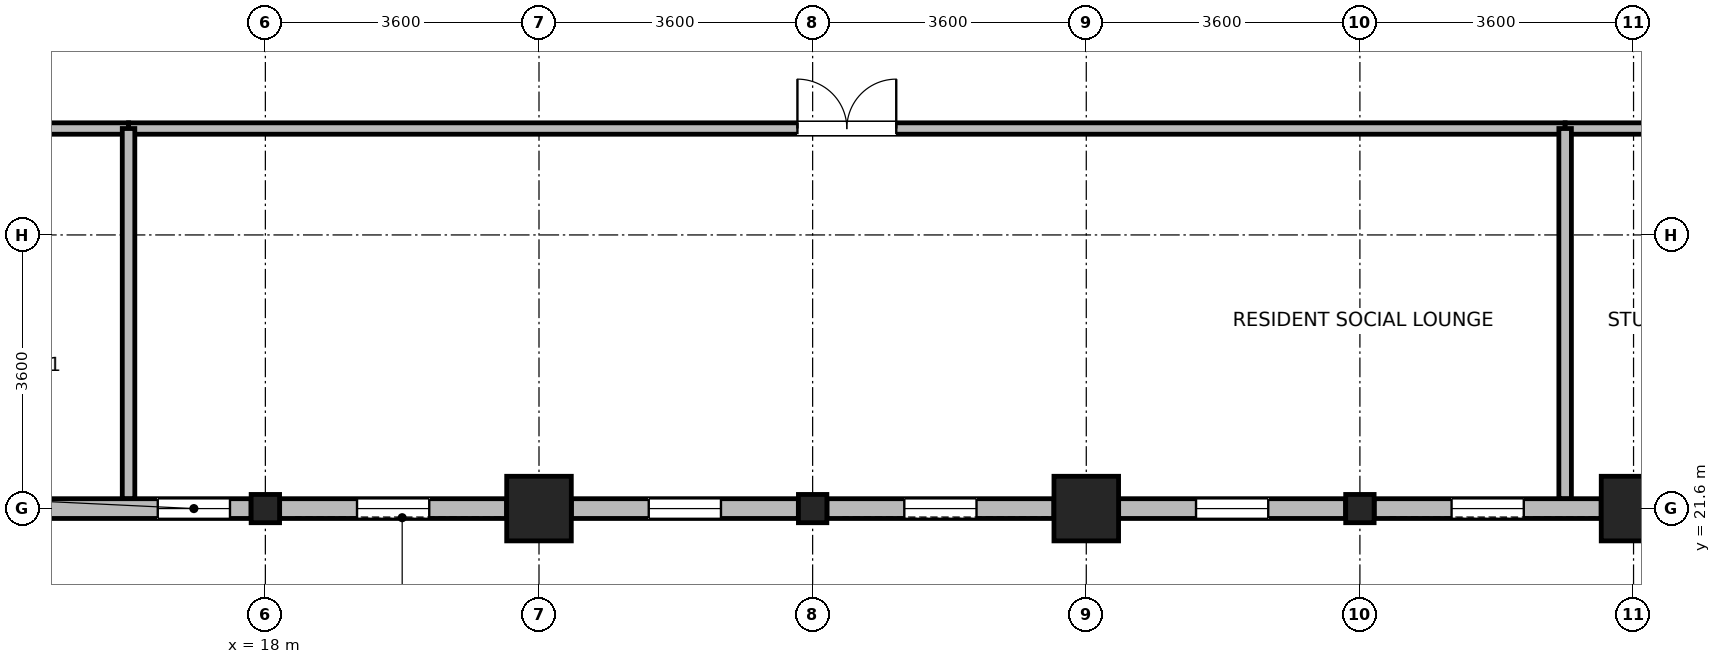
"""IFC4 building model, lengths in metres.
Left out: names, types, materials, properties, quantities, classifications, styles, units other than length and angle.
Written with IfcOpenShell. Run it as: python <this file> out.ifc"""

import sys

from ifc_helpers import new_model, si_unit, direction, frame, frame_2d, origin, origin_2d, place, context, subcontext, project, spatial, rectangle, i_section, extrude, source, transform, mapped, element, fill, save


model = new_model("IFC4")
c1 = context("Model", 3, precision=1e-05, world=origin(), true_north=direction((0.0, 1.0)))
c2 = subcontext(c1, "Body", "Model", "MODEL_VIEW")
j1 = project(units=[si_unit("LENGTHUNIT", "METRE"), si_unit("PLANEANGLEUNIT", "RADIAN")], contexts=[c1])
p1 = place(None, origin())
s1 = spatial("IfcSite", under=j1, at=p1, CompositionType="ELEMENT")
p2 = place(p1, origin())
s2 = spatial("IfcBuilding", under=s1, at=p2, CompositionType="ELEMENT")
p3 = place(p2, frame((0.0, 0.0, 279.5)))
s3 = spatial("IfcBuildingStorey", under=s2, at=p3, CompositionType="ELEMENT", Elevation=279.5)
m1 = source(origin(), c2, "Body", "SweptSolid", [
    extrude(rectangle(XDim=0.85, YDim=0.85, at=origin_2d()), origin(), (0.0, 0.0, 1.0), 3.7),
])
for number, where, z_axis, x_axis in (
    (1, (21.6, 21.6, 0.0), (0.0, 0.0, 1.0), (1.0, 0.0, 0.0)),
    (2, (28.8, 21.6, 0.0), (0.0, 0.0, 1.0), (1.0, 0.0, 0.0)),
    (3, (36.0, 21.6, 0.0), (0.0, 0.0, 1.0), (1.0, 0.0, 0.0)),
):
    element("IfcColumn", number, at=place(p3, frame(where, z_axis=z_axis, x_axis=x_axis)), inside=s3, PredefinedType="COLUMN", context=c2, shape_type="MappedRepresentation", body=[
        mapped(m1, transform((0.0, 0.0, 0.0), x_axis=(1.0, 0.0, 0.0), y_axis=(0.0, 1.0, 0.0), z_axis=(0.0, 0.0, 1.0), scale=1.0)),
    ])
m2 = source(origin(), c2, "Body", "SweptSolid", [
    extrude(i_section(OverallWidth=0.374, OverallDepth=0.372, WebThickness=0.015, FlangeThickness=0.026, FilletRadius=0.015, at=origin_2d()), origin(), (0.0, 0.0, 1.0), 3.7),
])
for number, where, z_axis, x_axis in (
    (4, (18.0, 21.6, 0.0), (0.0, 0.0, 1.0), (1.0, 0.0, 0.0)),
    (5, (25.2, 21.6, 0.0), (0.0, 0.0, 1.0), (1.0, 0.0, 0.0)),
    (6, (32.4, 21.6, 0.0), (0.0, 0.0, 1.0), (1.0, 0.0, 0.0)),
):
    element("IfcColumn", number, at=place(p3, frame(where, z_axis=z_axis, x_axis=x_axis)), inside=s3, PredefinedType="COLUMN", context=c2, shape_type="MappedRepresentation", body=[
        mapped(m2, transform((0.0, 0.0, 0.0), x_axis=(1.0, 0.0, 0.0), y_axis=(0.0, 1.0, 0.0), z_axis=(0.0, 0.0, 1.0), scale=1.0)),
    ])
p4 = place(p3, frame((17.812, 21.6, 0.0), z_axis=(0.0, 0.0, 1.0), x_axis=(-1.0, 0.0, 0.0)))
e7 = element("IfcWall", 7, at=p4, inside=s3, PredefinedType="STANDARD", context=c2, shape_type="SweptSolid", body=[
    extrude(rectangle(XDim=2.986, YDim=0.26, at=frame_2d((1.493, 0.0))), origin(), (0.0, 0.0, 1.0), 3.055),
])
p5 = place(p4, frame((0.278, 0.0, 0.85)))
e8 = element("IfcOpeningElement", 8, at=p5, cuts=e7, PredefinedType="OPENING", context=c2, shape_type="SweptSolid", body=[
    extrude(rectangle(XDim=0.95, YDim=1.75, at=frame_2d((0.475, 0.875))), frame((0.0, 0.14, 0.0), z_axis=(0.0, -1.0, 0.0), x_axis=(1.0, 0.0, 0.0)), (0.0, 0.0, 1.0), 0.28),
])
p6 = place(p3, frame((21.174, 21.6, 0.0), z_axis=(0.0, 0.0, 1.0), x_axis=(-1.0, 0.0, 0.0)))
e9 = element("IfcWall", 9, at=p6, inside=s3, PredefinedType="STANDARD", context=c2, shape_type="SweptSolid", body=[
    extrude(rectangle(XDim=2.986, YDim=0.26, at=frame_2d((1.493, 0.0))), origin(), (0.0, 0.0, 1.0), 3.055),
])
p7 = place(p6, frame((1.018, 0.0, 0.85)))
e10 = element("IfcOpeningElement", 10, at=p7, cuts=e9, PredefinedType="OPENING", context=c2, shape_type="SweptSolid", body=[
    extrude(rectangle(XDim=0.95, YDim=1.75, at=frame_2d((0.475, 0.875))), frame((0.0, 0.14, 0.0), z_axis=(0.0, -1.0, 0.0), x_axis=(1.0, 0.0, 0.0)), (0.0, 0.0, 1.0), 0.28),
])
p8 = place(p3, frame((25.012, 21.6, 0.0), z_axis=(0.0, 0.0, 1.0), x_axis=(-1.0, 0.0, 0.0)))
e11 = element("IfcWall", 11, at=p8, inside=s3, PredefinedType="STANDARD", context=c2, shape_type="SweptSolid", body=[
    extrude(rectangle(XDim=2.986, YDim=0.26, at=frame_2d((1.493, 0.0))), origin(), (0.0, 0.0, 1.0), 3.055),
])
p9 = place(p8, frame((1.018, 0.0, 0.85)))
e12 = element("IfcOpeningElement", 12, at=p9, cuts=e11, PredefinedType="OPENING", context=c2, shape_type="SweptSolid", body=[
    extrude(rectangle(XDim=0.95, YDim=1.75, at=frame_2d((0.475, 0.875))), frame((0.0, 0.14, 0.0), z_axis=(0.0, -1.0, 0.0), x_axis=(1.0, 0.0, 0.0)), (0.0, 0.0, 1.0), 0.28),
])
p10 = place(p3, frame((28.374, 21.6, 0.0), z_axis=(0.0, 0.0, 1.0), x_axis=(-1.0, 0.0, 0.0)))
e13 = element("IfcWall", 13, at=p10, inside=s3, PredefinedType="STANDARD", context=c2, shape_type="SweptSolid", body=[
    extrude(rectangle(XDim=2.986, YDim=0.26, at=frame_2d((1.493, 0.0))), origin(), (0.0, 0.0, 1.0), 3.055),
])
p11 = place(p10, frame((1.018, 0.0, 0.85)))
e14 = element("IfcOpeningElement", 14, at=p11, cuts=e13, PredefinedType="OPENING", context=c2, shape_type="SweptSolid", body=[
    extrude(rectangle(XDim=0.95, YDim=1.75, at=frame_2d((0.475, 0.875))), frame((0.0, 0.14, 0.0), z_axis=(0.0, -1.0, 0.0), x_axis=(1.0, 0.0, 0.0)), (0.0, 0.0, 1.0), 0.28),
])
p12 = place(p3, frame((32.212, 21.6, 0.0), z_axis=(0.0, 0.0, 1.0), x_axis=(-1.0, 0.0, 0.0)))
e15 = element("IfcWall", 15, at=p12, inside=s3, PredefinedType="STANDARD", context=c2, shape_type="SweptSolid", body=[
    extrude(rectangle(XDim=2.986, YDim=0.26, at=frame_2d((1.493, 0.0))), origin(), (0.0, 0.0, 1.0), 3.055),
])
p13 = place(p12, frame((1.018, 0.0, 0.85)))
e16 = element("IfcOpeningElement", 16, at=p13, cuts=e15, PredefinedType="OPENING", context=c2, shape_type="SweptSolid", body=[
    extrude(rectangle(XDim=0.95, YDim=1.75, at=frame_2d((0.475, 0.875))), frame((0.0, 0.14, 0.0), z_axis=(0.0, -1.0, 0.0), x_axis=(1.0, 0.0, 0.0)), (0.0, 0.0, 1.0), 0.28),
])
p14 = place(p3, frame((35.574, 21.6, 0.0), z_axis=(0.0, 0.0, 1.0), x_axis=(-1.0, 0.0, 0.0)))
e17 = element("IfcWall", 17, at=p14, inside=s3, PredefinedType="STANDARD", context=c2, shape_type="SweptSolid", body=[
    extrude(rectangle(XDim=2.986, YDim=0.26, at=frame_2d((1.493, 0.0))), origin(), (0.0, 0.0, 1.0), 3.055),
])
p15 = place(p14, frame((1.018, 0.0, 0.85)))
e18 = element("IfcOpeningElement", 18, at=p15, cuts=e17, PredefinedType="OPENING", context=c2, shape_type="SweptSolid", body=[
    extrude(rectangle(XDim=0.95, YDim=1.75, at=frame_2d((0.475, 0.875))), frame((0.0, 0.14, 0.0), z_axis=(0.0, -1.0, 0.0), x_axis=(1.0, 0.0, 0.0)), (0.0, 0.0, 1.0), 0.28),
])
p16 = place(p3, frame((16.2, 26.6, 0.0), z_axis=(0.0, 0.0, 1.0), x_axis=(1.0, 0.0, 0.0)))
e19 = element("IfcWall", 19, at=p16, inside=s3, PredefinedType="PARTITIONING", context=c2, shape_type="SweptSolid", body=[
    extrude(rectangle(XDim=18.9, YDim=0.15, at=frame_2d((9.45, 0.0))), origin(), (0.0, 0.0, 1.0), 3.455),
])
p17 = place(p16, frame((8.8, 0.0, 0.0)))
e20 = element("IfcOpeningElement", 20, at=p17, cuts=e19, PredefinedType="OPENING", context=c2, shape_type="SweptSolid", body=[
    extrude(rectangle(XDim=1.3, YDim=2.12, at=frame_2d((0.65, 1.06))), frame((0.0, 0.085, 0.0), z_axis=(0.0, -1.0, 0.0), x_axis=(1.0, 0.0, 0.0)), (0.0, 0.0, 1.0), 0.17),
])
p18 = place(p3, frame((3.732, 26.6, 0.0), z_axis=(0.0, 0.0, 1.0), x_axis=(1.0, 0.0, 0.0)))
e21 = element("IfcWall", 21, at=p18, inside=s3, PredefinedType="PARTITIONING", context=c2, shape_type="SweptSolid", body=[
    extrude(rectangle(XDim=12.468, YDim=0.15, at=frame_2d((6.234, 0.0))), origin(), (0.0, 0.0, 1.0), 3.455),
])
p19 = place(p18, frame((5.584, 0.0, 0.0)))
e22 = element("IfcOpeningElement", 22, at=p19, cuts=e21, PredefinedType="OPENING", context=c2, shape_type="SweptSolid", body=[
    extrude(rectangle(XDim=1.3, YDim=2.12, at=frame_2d((0.65, 1.06))), frame((0.0, 0.085, 0.0), z_axis=(0.0, -1.0, 0.0), x_axis=(1.0, 0.0, 0.0)), (0.0, 0.0, 1.0), 0.17),
])
p20 = place(p3, frame((35.1, 26.6, 0.0), z_axis=(0.0, 0.0, 1.0), x_axis=(1.0, 0.0, 0.0)))
e23 = element("IfcWall", 23, at=p20, inside=s3, PredefinedType="PARTITIONING", context=c2, shape_type="SweptSolid", body=[
    extrude(rectangle(XDim=9.16, YDim=0.15, at=frame_2d((4.58, 0.0))), origin(), (0.0, 0.0, 1.0), 3.455),
])
p21 = place(p20, frame((4.105, 0.0, 0.0)))
e24 = element("IfcOpeningElement", 24, at=p21, cuts=e23, PredefinedType="OPENING", context=c2, shape_type="SweptSolid", body=[
    extrude(rectangle(XDim=0.95, YDim=2.1, at=frame_2d((0.475, 1.05))), frame((0.0, 0.085, 0.0), z_axis=(0.0, -1.0, 0.0), x_axis=(1.0, 0.0, 0.0)), (0.0, 0.0, 1.0), 0.17),
])
for number, where, z_axis, x_axis in (
    (25, (16.2, 21.732, 0.0), (0.0, 0.0, 1.0), (0.0, 1.0, 0.0)),
    (26, (35.1, 21.732, 0.0), (0.0, 0.0, 1.0), (0.0, 1.0, 0.0)),
):
    element("IfcWall", number, at=place(p3, frame(where, z_axis=z_axis, x_axis=x_axis)), inside=s3, PredefinedType="PARTITIONING", context=c2, shape_type="SweptSolid", body=[
        extrude(rectangle(XDim=4.868, YDim=0.165, at=frame_2d((2.434, 0.0))), origin(), (0.0, 0.0, 1.0), 3.455),
    ])
p22 = place(p5, origin())
e27 = element("IfcWindow", 27, at=p22, inside=s3, PartitioningType="SINGLE_PANEL", PredefinedType="WINDOW", context=c2, shape_type="SweptSolid", body=[
    extrude(rectangle(XDim=0.95, YDim=1.75, at=frame_2d((0.475, 0.875))), frame((0.0, 0.03, 0.0), z_axis=(0.0, -1.0, 0.0), x_axis=(1.0, 0.0, 0.0)), (0.0, 0.0, 1.0), 0.06),
])
fill(e8, e27)
p23 = place(p7, origin())
e28 = element("IfcWindow", 28, at=p23, inside=s3, PartitioningType="SINGLE_PANEL", PredefinedType="WINDOW", context=c2, shape_type="SweptSolid", body=[
    extrude(rectangle(XDim=0.95, YDim=1.75, at=frame_2d((0.475, 0.875))), frame((0.0, 0.03, 0.0), z_axis=(0.0, -1.0, 0.0), x_axis=(1.0, 0.0, 0.0)), (0.0, 0.0, 1.0), 0.06),
])
fill(e10, e28)
p24 = place(p9, origin())
e29 = element("IfcWindow", 29, at=p24, inside=s3, PartitioningType="SINGLE_PANEL", PredefinedType="WINDOW", context=c2, shape_type="SweptSolid", body=[
    extrude(rectangle(XDim=0.95, YDim=1.75, at=frame_2d((0.475, 0.875))), frame((0.0, 0.03, 0.0), z_axis=(0.0, -1.0, 0.0), x_axis=(1.0, 0.0, 0.0)), (0.0, 0.0, 1.0), 0.06),
])
fill(e12, e29)
p25 = place(p11, origin())
e30 = element("IfcWindow", 30, at=p25, inside=s3, PartitioningType="SINGLE_PANEL", PredefinedType="WINDOW", context=c2, shape_type="SweptSolid", body=[
    extrude(rectangle(XDim=0.95, YDim=1.75, at=frame_2d((0.475, 0.875))), frame((0.0, 0.03, 0.0), z_axis=(0.0, -1.0, 0.0), x_axis=(1.0, 0.0, 0.0)), (0.0, 0.0, 1.0), 0.06),
])
fill(e14, e30)
p26 = place(p13, origin())
e31 = element("IfcWindow", 31, at=p26, inside=s3, PartitioningType="SINGLE_PANEL", PredefinedType="WINDOW", context=c2, shape_type="SweptSolid", body=[
    extrude(rectangle(XDim=0.95, YDim=1.75, at=frame_2d((0.475, 0.875))), frame((0.0, 0.03, 0.0), z_axis=(0.0, -1.0, 0.0), x_axis=(1.0, 0.0, 0.0)), (0.0, 0.0, 1.0), 0.06),
])
fill(e16, e31)
p27 = place(p15, origin())
e32 = element("IfcWindow", 32, at=p27, inside=s3, PartitioningType="SINGLE_PANEL", PredefinedType="WINDOW", context=c2, shape_type="SweptSolid", body=[
    extrude(rectangle(XDim=0.95, YDim=1.75, at=frame_2d((0.475, 0.875))), frame((0.0, 0.03, 0.0), z_axis=(0.0, -1.0, 0.0), x_axis=(1.0, 0.0, 0.0)), (0.0, 0.0, 1.0), 0.06),
])
fill(e18, e32)
p28 = place(p17, origin())
e33 = element("IfcDoor", 33, at=p28, inside=s3, OperationType="DOUBLE_DOOR_SINGLE_SWING", PredefinedType="DOOR", context=c2, shape_type="SweptSolid", body=[
    extrude(rectangle(XDim=1.3, YDim=2.12, at=frame_2d((0.65, 1.06))), frame((0.0, 0.025, 0.0), z_axis=(0.0, -1.0, 0.0), x_axis=(1.0, 0.0, 0.0)), (0.0, 0.0, 1.0), 0.05),
])
fill(e20, e33)
save(model, sys.argv[1])
